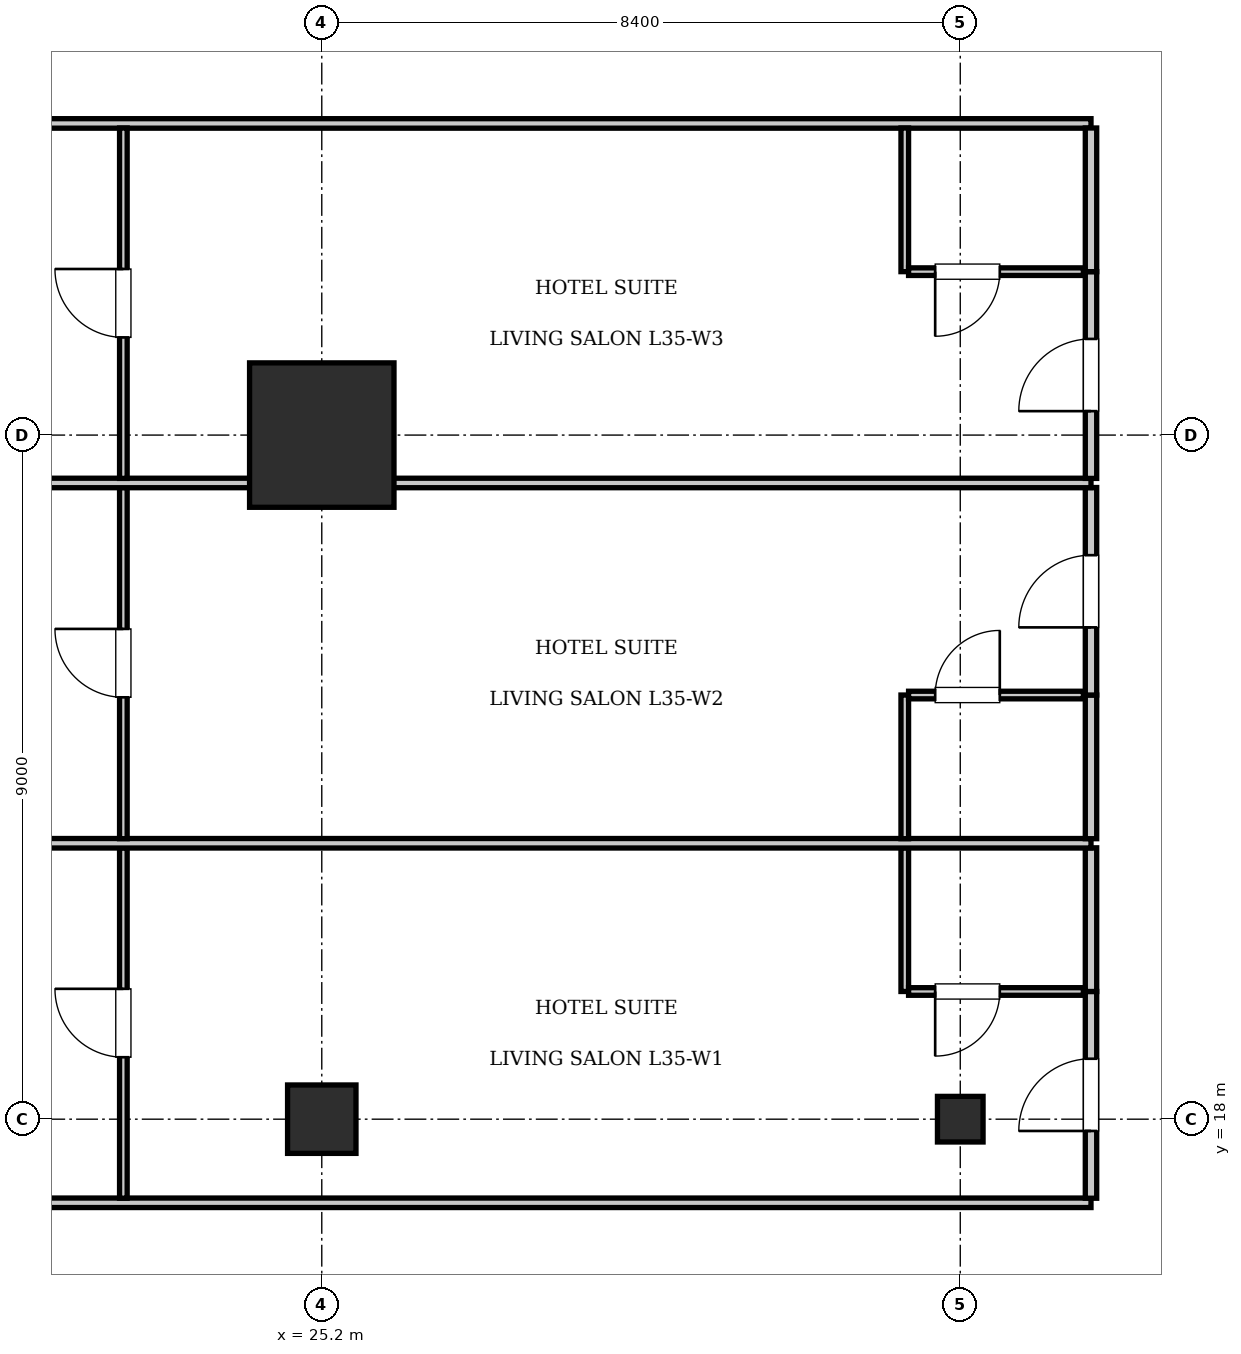
"""IFC4 building model, lengths in metres.
Left out: names, types, materials, properties, quantities, classifications, styles, units other than length and angle.
Written with IfcOpenShell. Run it as: python <this file> out.ifc"""

import sys

from ifc_helpers import new_model, si_unit, direction, frame, frame_2d, origin, origin_2d, place, context, subcontext, project, spatial, rectangle, i_section, extrude, element, fill, save


model = new_model("IFC4")
c1 = context("Model", 3, precision=1e-05, world=origin(), true_north=direction((0.0, 1.0)))
c2 = subcontext(c1, "Body", "Model", "MODEL_VIEW")
j1 = project(units=[si_unit("LENGTHUNIT", "METRE"), si_unit("PLANEANGLEUNIT", "RADIAN")], contexts=[c1])
p1 = place(None, origin())
s1 = spatial("IfcSite", under=j1, at=p1, CompositionType="ELEMENT")
p2 = place(p1, origin())
s2 = spatial("IfcBuilding", under=s1, at=p2, CompositionType="ELEMENT")
p3 = place(p2, frame((0.0, 0.0, 146.65)))
s3 = spatial("IfcBuildingStorey", under=s2, at=p3, CompositionType="ELEMENT", Elevation=146.65)
p4 = place(p3, frame((25.2, 27.0, 0.0), z_axis=(0.0, 0.0, 1.0), x_axis=(1.0, 0.0, 0.0)))
e1 = element("IfcColumn", 1, at=p4, inside=s3, PredefinedType="COLUMN", context=c2, shape_type="SweptSolid", body=[
    extrude(rectangle(XDim=1.9, YDim=1.9, at=origin_2d()), origin(), (0.0, 0.0, 1.0), 3.85),
])
p5 = place(p3, frame((25.2, 18.0, 0.0), z_axis=(0.0, 0.0, 1.0), x_axis=(1.0, 0.0, 0.0)))
e2 = element("IfcColumn", 2, at=p5, inside=s3, PredefinedType="COLUMN", context=c2, shape_type="SweptSolid", body=[
    extrude(rectangle(XDim=0.9, YDim=0.9, at=origin_2d()), origin(), (0.0, 0.0, 1.0), 3.85),
])
p6 = place(p3, frame((33.6, 18.0, 0.0), z_axis=(0.0, 0.0, 1.0), x_axis=(1.0, 0.0, 0.0)))
e3 = element("IfcColumn", 3, at=p6, inside=s3, PredefinedType="COLUMN", context=c2, shape_type="SweptSolid", body=[
    extrude(i_section(OverallWidth=0.6, OverallDepth=0.6, WebThickness=0.025, FlangeThickness=0.038, at=origin_2d()), origin(), (0.0, 0.0, 1.0), 3.85),
])
for number, where, z_axis, x_axis in (
    (4, (13.2, 16.9, 0.0), (0.0, 0.0, 1.0), (1.0, 0.0, 0.0)),
    (5, (13.2, 31.1, 0.0), (0.0, 0.0, 1.0), (1.0, 0.0, 0.0)),
):
    element("IfcWall", number, at=place(p3, frame(where, z_axis=z_axis, x_axis=x_axis)), inside=s3, PredefinedType="PARTITIONING", context=c2, shape_type="SweptSolid", body=[
        extrude(rectangle(XDim=22.12, YDim=0.125, at=frame_2d((11.06, 0.0))), origin(), (0.0, 0.0, 1.0), 3.61),
    ])
p7 = place(p3, frame((35.32, 16.96, 0.0), z_axis=(0.0, 0.0, 1.0), x_axis=(0.0, 1.0, 0.0)))
e6 = element("IfcWall", 6, at=p7, inside=s3, PredefinedType="PARTITIONING", context=c2, shape_type="SweptSolid", body=[
    extrude(rectangle(XDim=2.72, YDim=0.15, at=frame_2d((1.36, 0.0))), origin(), (0.0, 0.0, 1.0), 3.61),
])
p8 = place(p7, frame((0.885, 0.0, 0.0)))
e7 = element("IfcOpeningElement", 7, at=p8, cuts=e6, PredefinedType="OPENING", context=c2, shape_type="SweptSolid", body=[
    extrude(rectangle(XDim=0.95, YDim=2.15, at=frame_2d((0.475, 1.075))), frame((0.0, 0.085, 0.0), z_axis=(0.0, -1.0, 0.0), x_axis=(1.0, 0.0, 0.0)), (0.0, 0.0, 1.0), 0.17),
])
p9 = place(p3, frame((35.32, 19.68, 0.0), z_axis=(0.0, 0.0, 1.0), x_axis=(0.0, 1.0, 0.0)))
e8 = element("IfcWall", 8, at=p9, inside=s3, PredefinedType="PARTITIONING", context=c2, shape_type="SweptSolid", body=[
    extrude(rectangle(XDim=1.89, YDim=0.15, at=frame_2d((0.945, 0.0))), origin(), (0.0, 0.0, 1.0), 3.61),
])
p10 = place(p3, frame((32.87, 19.68, 0.0), z_axis=(0.0, 0.0, 1.0), x_axis=(0.0, 1.0, 0.0)))
e9 = element("IfcWall", 9, at=p10, inside=s3, PredefinedType="PARTITIONING", context=c2, shape_type="SweptSolid", body=[
    extrude(rectangle(XDim=1.89, YDim=0.1, at=frame_2d((0.945, 0.0))), origin(), (0.0, 0.0, 1.0), 3.61),
])
p11 = place(p3, frame((32.92, 19.68, 0.0), z_axis=(0.0, 0.0, 1.0), x_axis=(1.0, 0.0, 0.0)))
e10 = element("IfcWall", 10, at=p11, inside=s3, PredefinedType="PARTITIONING", context=c2, shape_type="SweptSolid", body=[
    extrude(rectangle(XDim=2.3, YDim=0.1, at=frame_2d((1.15, 0.0))), origin(), (0.0, 0.0, 1.0), 3.61),
])
p12 = place(p11, frame((0.35, 0.0, 0.0)))
e11 = element("IfcOpeningElement", 11, at=p12, cuts=e10, PredefinedType="OPENING", context=c2, shape_type="SweptSolid", body=[
    extrude(rectangle(XDim=0.85, YDim=2.1, at=frame_2d((0.425, 1.05))), frame((0.0, 0.06, 0.0), z_axis=(0.0, -1.0, 0.0), x_axis=(1.0, 0.0, 0.0)), (0.0, 0.0, 1.0), 0.12),
])
p13 = place(p3, frame((22.59, 16.96, 0.0), z_axis=(0.0, 0.0, 1.0), x_axis=(0.0, 1.0, 0.0)))
e12 = element("IfcWall", 12, at=p13, inside=s3, PredefinedType="PARTITIONING", context=c2, shape_type="SweptSolid", body=[
    extrude(rectangle(XDim=4.61, YDim=0.1, at=frame_2d((2.305, 0.0))), origin(), (0.0, 0.0, 1.0), 3.61),
])
p14 = place(p13, frame((1.855, 0.0, 0.0)))
e13 = element("IfcOpeningElement", 13, at=p14, cuts=e12, PredefinedType="OPENING", context=c2, shape_type="SweptSolid", body=[
    extrude(rectangle(XDim=0.9, YDim=2.1, at=frame_2d((0.45, 1.05))), frame((0.0, 0.06, 0.0), z_axis=(0.0, -1.0, 0.0), x_axis=(1.0, 0.0, 0.0)), (0.0, 0.0, 1.0), 0.12),
])
p15 = place(p3, frame((13.2, 21.63, 0.0), z_axis=(0.0, 0.0, 1.0), x_axis=(1.0, 0.0, 0.0)))
e14 = element("IfcWall", 14, at=p15, inside=s3, PredefinedType="PARTITIONING", context=c2, shape_type="SweptSolid", body=[
    extrude(rectangle(XDim=22.12, YDim=0.125, at=frame_2d((11.06, 0.0))), origin(), (0.0, 0.0, 1.0), 3.61),
])
p16 = place(p3, frame((35.32, 21.69, 0.0), z_axis=(0.0, 0.0, 1.0), x_axis=(0.0, 1.0, 0.0)))
e15 = element("IfcWall", 15, at=p16, inside=s3, PredefinedType="PARTITIONING", context=c2, shape_type="SweptSolid", body=[
    extrude(rectangle(XDim=1.89, YDim=0.15, at=frame_2d((0.945, 0.0))), origin(), (0.0, 0.0, 1.0), 3.61),
])
p17 = place(p3, frame((35.32, 23.58, 0.0), z_axis=(0.0, 0.0, 1.0), x_axis=(0.0, 1.0, 0.0)))
e16 = element("IfcWall", 16, at=p17, inside=s3, PredefinedType="PARTITIONING", context=c2, shape_type="SweptSolid", body=[
    extrude(rectangle(XDim=2.73, YDim=0.15, at=frame_2d((1.365, 0.0))), origin(), (0.0, 0.0, 1.0), 3.61),
])
p18 = place(p17, frame((0.89, 0.0, 0.0)))
e17 = element("IfcOpeningElement", 17, at=p18, cuts=e16, PredefinedType="OPENING", context=c2, shape_type="SweptSolid", body=[
    extrude(rectangle(XDim=0.95, YDim=2.15, at=frame_2d((0.475, 1.075))), frame((0.0, 0.085, 0.0), z_axis=(0.0, -1.0, 0.0), x_axis=(1.0, 0.0, 0.0)), (0.0, 0.0, 1.0), 0.17),
])
p19 = place(p3, frame((32.87, 21.69, 0.0), z_axis=(0.0, 0.0, 1.0), x_axis=(0.0, 1.0, 0.0)))
e18 = element("IfcWall", 18, at=p19, inside=s3, PredefinedType="PARTITIONING", context=c2, shape_type="SweptSolid", body=[
    extrude(rectangle(XDim=1.89, YDim=0.1, at=frame_2d((0.945, 0.0))), origin(), (0.0, 0.0, 1.0), 3.61),
])
p20 = place(p3, frame((32.92, 23.58, 0.0), z_axis=(0.0, 0.0, 1.0), x_axis=(1.0, 0.0, 0.0)))
e19 = element("IfcWall", 19, at=p20, inside=s3, PredefinedType="PARTITIONING", context=c2, shape_type="SweptSolid", body=[
    extrude(rectangle(XDim=2.3, YDim=0.1, at=frame_2d((1.15, 0.0))), origin(), (0.0, 0.0, 1.0), 3.61),
])
p21 = place(p20, frame((0.35, 0.0, 0.0)))
e20 = element("IfcOpeningElement", 20, at=p21, cuts=e19, PredefinedType="OPENING", context=c2, shape_type="SweptSolid", body=[
    extrude(rectangle(XDim=0.85, YDim=2.1, at=frame_2d((0.425, 1.05))), frame((0.0, 0.06, 0.0), z_axis=(0.0, -1.0, 0.0), x_axis=(1.0, 0.0, 0.0)), (0.0, 0.0, 1.0), 0.12),
])
p22 = place(p3, frame((22.59, 21.69, 0.0), z_axis=(0.0, 0.0, 1.0), x_axis=(0.0, 1.0, 0.0)))
e21 = element("IfcWall", 21, at=p22, inside=s3, PredefinedType="PARTITIONING", context=c2, shape_type="SweptSolid", body=[
    extrude(rectangle(XDim=4.62, YDim=0.1, at=frame_2d((2.31, 0.0))), origin(), (0.0, 0.0, 1.0), 3.61),
])
p23 = place(p22, frame((1.86, 0.0, 0.0)))
e22 = element("IfcOpeningElement", 22, at=p23, cuts=e21, PredefinedType="OPENING", context=c2, shape_type="SweptSolid", body=[
    extrude(rectangle(XDim=0.9, YDim=2.1, at=frame_2d((0.45, 1.05))), frame((0.0, 0.06, 0.0), z_axis=(0.0, -1.0, 0.0), x_axis=(1.0, 0.0, 0.0)), (0.0, 0.0, 1.0), 0.12),
])
p24 = place(p3, frame((13.2, 26.37, 0.0), z_axis=(0.0, 0.0, 1.0), x_axis=(1.0, 0.0, 0.0)))
e23 = element("IfcWall", 23, at=p24, inside=s3, PredefinedType="PARTITIONING", context=c2, shape_type="SweptSolid", body=[
    extrude(rectangle(XDim=22.12, YDim=0.125, at=frame_2d((11.06, 0.0))), origin(), (0.0, 0.0, 1.0), 3.61),
])
p25 = place(p3, frame((35.32, 26.43, 0.0), z_axis=(0.0, 0.0, 1.0), x_axis=(0.0, 1.0, 0.0)))
e24 = element("IfcWall", 24, at=p25, inside=s3, PredefinedType="PARTITIONING", context=c2, shape_type="SweptSolid", body=[
    extrude(rectangle(XDim=2.72, YDim=0.15, at=frame_2d((1.36, 0.0))), origin(), (0.0, 0.0, 1.0), 3.61),
])
p26 = place(p25, frame((0.885, 0.0, 0.0)))
e25 = element("IfcOpeningElement", 25, at=p26, cuts=e24, PredefinedType="OPENING", context=c2, shape_type="SweptSolid", body=[
    extrude(rectangle(XDim=0.95, YDim=2.15, at=frame_2d((0.475, 1.075))), frame((0.0, 0.085, 0.0), z_axis=(0.0, -1.0, 0.0), x_axis=(1.0, 0.0, 0.0)), (0.0, 0.0, 1.0), 0.17),
])
p27 = place(p3, frame((35.32, 29.15, 0.0), z_axis=(0.0, 0.0, 1.0), x_axis=(0.0, 1.0, 0.0)))
e26 = element("IfcWall", 26, at=p27, inside=s3, PredefinedType="PARTITIONING", context=c2, shape_type="SweptSolid", body=[
    extrude(rectangle(XDim=1.89, YDim=0.15, at=frame_2d((0.945, 0.0))), origin(), (0.0, 0.0, 1.0), 3.61),
])
p28 = place(p3, frame((32.87, 29.15, 0.0), z_axis=(0.0, 0.0, 1.0), x_axis=(0.0, 1.0, 0.0)))
e27 = element("IfcWall", 27, at=p28, inside=s3, PredefinedType="PARTITIONING", context=c2, shape_type="SweptSolid", body=[
    extrude(rectangle(XDim=1.89, YDim=0.1, at=frame_2d((0.945, 0.0))), origin(), (0.0, 0.0, 1.0), 3.61),
])
p29 = place(p3, frame((32.92, 29.15, 0.0), z_axis=(0.0, 0.0, 1.0), x_axis=(1.0, 0.0, 0.0)))
e28 = element("IfcWall", 28, at=p29, inside=s3, PredefinedType="PARTITIONING", context=c2, shape_type="SweptSolid", body=[
    extrude(rectangle(XDim=2.3, YDim=0.1, at=frame_2d((1.15, 0.0))), origin(), (0.0, 0.0, 1.0), 3.61),
])
p30 = place(p29, frame((0.35, 0.0, 0.0)))
e29 = element("IfcOpeningElement", 29, at=p30, cuts=e28, PredefinedType="OPENING", context=c2, shape_type="SweptSolid", body=[
    extrude(rectangle(XDim=0.85, YDim=2.1, at=frame_2d((0.425, 1.05))), frame((0.0, 0.06, 0.0), z_axis=(0.0, -1.0, 0.0), x_axis=(1.0, 0.0, 0.0)), (0.0, 0.0, 1.0), 0.12),
])
p31 = place(p3, frame((22.59, 26.43, 0.0), z_axis=(0.0, 0.0, 1.0), x_axis=(0.0, 1.0, 0.0)))
e30 = element("IfcWall", 30, at=p31, inside=s3, PredefinedType="PARTITIONING", context=c2, shape_type="SweptSolid", body=[
    extrude(rectangle(XDim=4.61, YDim=0.1, at=frame_2d((2.305, 0.0))), origin(), (0.0, 0.0, 1.0), 3.61),
])
p32 = place(p31, frame((1.855, 0.0, 0.0)))
e31 = element("IfcOpeningElement", 31, at=p32, cuts=e30, PredefinedType="OPENING", context=c2, shape_type="SweptSolid", body=[
    extrude(rectangle(XDim=0.9, YDim=2.1, at=frame_2d((0.45, 1.05))), frame((0.0, 0.06, 0.0), z_axis=(0.0, -1.0, 0.0), x_axis=(1.0, 0.0, 0.0)), (0.0, 0.0, 1.0), 0.12),
])
p33 = place(p12, frame((0.85, 0.0, 0.0), z_axis=(0.0, 0.0, 1.0), x_axis=(-1.0, 0.0, 0.0)))
e32 = element("IfcDoor", 32, at=p33, inside=s3, OperationType="SINGLE_SWING_RIGHT", PredefinedType="DOOR", context=c2, shape_type="SweptSolid", body=[
    extrude(rectangle(XDim=0.85, YDim=2.1, at=frame_2d((0.425, 1.05))), frame((0.0, 0.025, 0.0), z_axis=(0.0, -1.0, 0.0), x_axis=(1.0, 0.0, 0.0)), (0.0, 0.0, 1.0), 0.05),
])
fill(e11, e32)
p34 = place(p8, origin())
e33 = element("IfcDoor", 33, at=p34, inside=s3, OperationType="SINGLE_SWING_LEFT", PredefinedType="DOOR", context=c2, shape_type="SweptSolid", body=[
    extrude(rectangle(XDim=0.95, YDim=2.15, at=frame_2d((0.475, 1.075))), frame((0.0, 0.025, 0.0), z_axis=(0.0, -1.0, 0.0), x_axis=(1.0, 0.0, 0.0)), (0.0, 0.0, 1.0), 0.05),
])
fill(e7, e33)
p35 = place(p14, origin())
e34 = element("IfcDoor", 34, at=p35, inside=s3, OperationType="SINGLE_SWING_RIGHT", PredefinedType="DOOR", context=c2, shape_type="SweptSolid", body=[
    extrude(rectangle(XDim=0.9, YDim=2.1, at=frame_2d((0.45, 1.05))), frame((0.0, 0.025, 0.0), z_axis=(0.0, -1.0, 0.0), x_axis=(1.0, 0.0, 0.0)), (0.0, 0.0, 1.0), 0.05),
])
fill(e13, e34)
p36 = place(p21, origin())
e35 = element("IfcDoor", 35, at=p36, inside=s3, OperationType="SINGLE_SWING_RIGHT", PredefinedType="DOOR", context=c2, shape_type="SweptSolid", body=[
    extrude(rectangle(XDim=0.85, YDim=2.1, at=frame_2d((0.425, 1.05))), frame((0.0, 0.025, 0.0), z_axis=(0.0, -1.0, 0.0), x_axis=(1.0, 0.0, 0.0)), (0.0, 0.0, 1.0), 0.05),
])
fill(e20, e35)
p37 = place(p18, origin())
e36 = element("IfcDoor", 36, at=p37, inside=s3, OperationType="SINGLE_SWING_LEFT", PredefinedType="DOOR", context=c2, shape_type="SweptSolid", body=[
    extrude(rectangle(XDim=0.95, YDim=2.15, at=frame_2d((0.475, 1.075))), frame((0.0, 0.025, 0.0), z_axis=(0.0, -1.0, 0.0), x_axis=(1.0, 0.0, 0.0)), (0.0, 0.0, 1.0), 0.05),
])
fill(e17, e36)
p38 = place(p23, origin())
e37 = element("IfcDoor", 37, at=p38, inside=s3, OperationType="SINGLE_SWING_RIGHT", PredefinedType="DOOR", context=c2, shape_type="SweptSolid", body=[
    extrude(rectangle(XDim=0.9, YDim=2.1, at=frame_2d((0.45, 1.05))), frame((0.0, 0.025, 0.0), z_axis=(0.0, -1.0, 0.0), x_axis=(1.0, 0.0, 0.0)), (0.0, 0.0, 1.0), 0.05),
])
fill(e22, e37)
p39 = place(p30, frame((0.85, 0.0, 0.0), z_axis=(0.0, 0.0, 1.0), x_axis=(-1.0, 0.0, 0.0)))
e38 = element("IfcDoor", 38, at=p39, inside=s3, OperationType="SINGLE_SWING_RIGHT", PredefinedType="DOOR", context=c2, shape_type="SweptSolid", body=[
    extrude(rectangle(XDim=0.85, YDim=2.1, at=frame_2d((0.425, 1.05))), frame((0.0, 0.025, 0.0), z_axis=(0.0, -1.0, 0.0), x_axis=(1.0, 0.0, 0.0)), (0.0, 0.0, 1.0), 0.05),
])
fill(e29, e38)
p40 = place(p26, origin())
e39 = element("IfcDoor", 39, at=p40, inside=s3, OperationType="SINGLE_SWING_LEFT", PredefinedType="DOOR", context=c2, shape_type="SweptSolid", body=[
    extrude(rectangle(XDim=0.95, YDim=2.15, at=frame_2d((0.475, 1.075))), frame((0.0, 0.025, 0.0), z_axis=(0.0, -1.0, 0.0), x_axis=(1.0, 0.0, 0.0)), (0.0, 0.0, 1.0), 0.05),
])
fill(e25, e39)
p41 = place(p32, origin())
e40 = element("IfcDoor", 40, at=p41, inside=s3, OperationType="SINGLE_SWING_RIGHT", PredefinedType="DOOR", context=c2, shape_type="SweptSolid", body=[
    extrude(rectangle(XDim=0.9, YDim=2.1, at=frame_2d((0.45, 1.05))), frame((0.0, 0.025, 0.0), z_axis=(0.0, -1.0, 0.0), x_axis=(1.0, 0.0, 0.0)), (0.0, 0.0, 1.0), 0.05),
])
fill(e31, e40)
save(model, sys.argv[1])
